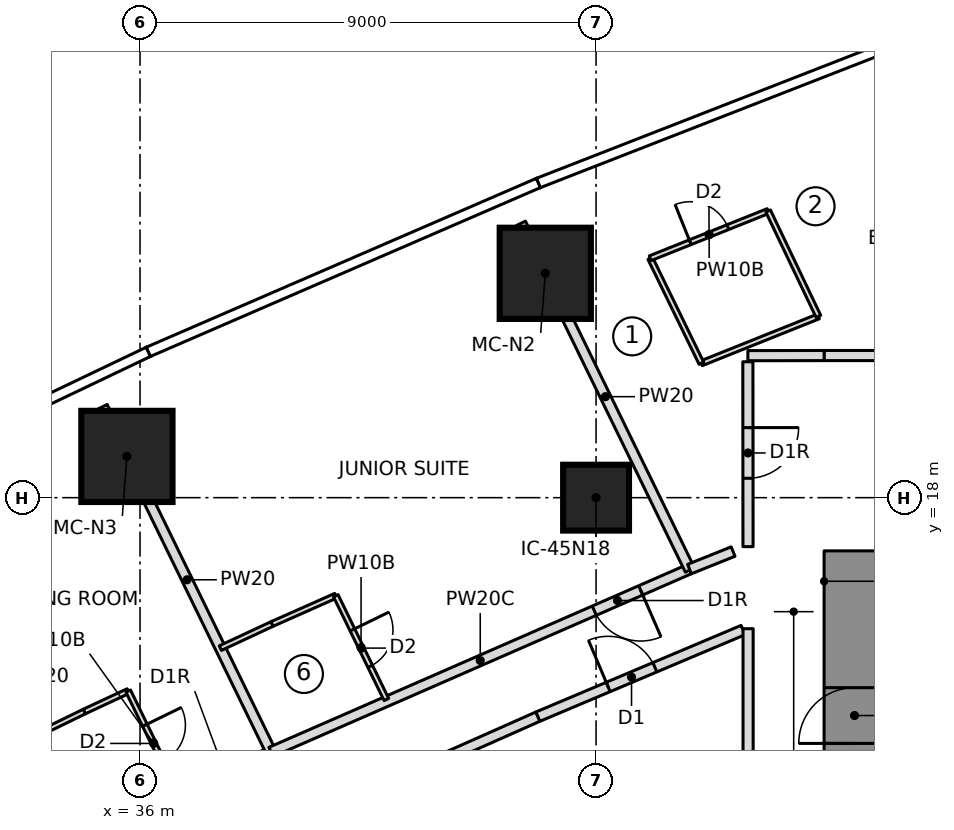
"""IFC4 building model, lengths in metres.
Left out: names, types, materials, properties, quantities, classifications, styles, units other than length and angle.
Written with IfcOpenShell. Run it as: python <this file> out.ifc"""

import sys

from ifc_helpers import new_model, si_unit, direction, frame, frame_2d, origin, origin_2d, place, context, subcontext, project, spatial, rectangle, extrude, element, fill, save


model = new_model("IFC4")
c1 = context("Model", 3, precision=1e-05, world=origin(), true_north=direction((0.0, 1.0)))
c2 = subcontext(c1, "Body", "Model", "MODEL_VIEW")
j1 = project(units=[si_unit("LENGTHUNIT", "METRE"), si_unit("PLANEANGLEUNIT", "RADIAN")], contexts=[c1])
p1 = place(None, origin())
s1 = spatial("IfcSite", under=j1, at=p1, CompositionType="ELEMENT")
p2 = place(p1, origin())
s2 = spatial("IfcBuilding", under=s1, at=p2, CompositionType="ELEMENT")
p3 = place(p2, frame((0.0, 0.0, 43.15)))
s3 = spatial("IfcBuildingStorey", under=s2, at=p3, CompositionType="ELEMENT", Elevation=43.15)
p4 = place(p3, frame((50.1, 6.65, 0.0), z_axis=(0.0, 0.0, 1.0), x_axis=(0.0, 1.0, 0.0)))
e1 = element("IfcWall", 1, at=p4, inside=s3, PredefinedType="SHEAR", context=c2, shape_type="SweptSolid", body=[
    extrude(rectangle(XDim=10.3, YDim=1.2, at=frame_2d((5.15, 0.0))), origin(), (0.0, 0.0, 1.0), 3.55),
])
p5 = place(p4, frame((6.5, 0.0, 0.0)))
e2 = element("IfcOpeningElement", 2, at=p5, cuts=e1, PredefinedType="OPENING", context=c2, shape_type="SweptSolid", body=[
    extrude(rectangle(XDim=1.1, YDim=2.1, at=frame_2d((0.55, 1.05))), frame((0.0, 0.61, 0.0), z_axis=(0.0, -1.0, 0.0), x_axis=(1.0, 0.0, 0.0)), (0.0, 0.0, 1.0), 1.22),
])
for number, where, z_axis, x_axis in (
    (3, (43.998, 22.428, 0.0), (0.0, 0.0, 1.0), (1.0, 0.0, 0.0)),
    (4, (35.741, 18.814, 0.0), (0.0, 0.0, 1.0), (1.0, 0.0, 0.0)),
):
    element("IfcColumn", number, at=place(p3, frame(where, z_axis=z_axis, x_axis=x_axis)), inside=s3, PredefinedType="COLUMN", context=c2, shape_type="SweptSolid", body=[
        extrude(rectangle(XDim=1.8, YDim=1.8, at=origin_2d()), origin(), (0.0, 0.0, 1.0), 3.55),
    ])
p6 = place(p3, frame((45.0, 18.0, 0.0), z_axis=(0.0, 0.0, 1.0), x_axis=(1.0, 0.0, 0.0)))
e5 = element("IfcColumn", 5, at=p6, inside=s3, PredefinedType="COLUMN", context=c2, shape_type="SweptSolid", body=[
    extrude(rectangle(XDim=1.3, YDim=1.3, at=origin_2d()), origin(), (0.0, 0.0, 1.0), 3.55),
])
p7 = place(p3, frame((34.513, 11.05, 0.0), z_axis=(0.0, 0.0, 1.0), x_axis=(-0.438187612283, 0.898883538865, 0.0)))
e6 = element("IfcWall", 6, at=p7, inside=s3, PredefinedType="PARTITIONING", context=c2, shape_type="SweptSolid", body=[
    extrude(rectangle(XDim=7.582, YDim=0.2, at=frame_2d((3.791, 0.0))), origin(), (0.0, 0.0, 1.0), 3.25),
])
p8 = place(p3, frame((38.585, 12.981, 0.0), z_axis=(0.0, 0.0, 1.0), x_axis=(-0.903706948966, -0.428151550727, 0.0)))
e7 = element("IfcWall", 7, at=p8, inside=s3, PredefinedType="PARTITIONING", context=c2, shape_type="SweptSolid", body=[
    extrude(rectangle(XDim=4.506, YDim=0.2, at=frame_2d((2.253, 0.0))), origin(), (0.0, 0.0, 1.0), 3.25),
])
p9 = place(p8, frame((0.5, 0.0, 0.0)))
e8 = element("IfcOpeningElement", 8, at=p9, cuts=e7, PredefinedType="OPENING", context=c2, shape_type="SweptSolid", body=[
    extrude(rectangle(XDim=1.0, YDim=2.1, at=frame_2d((0.5, 1.05))), frame((0.0, 0.11, 0.0), z_axis=(0.0, -1.0, 0.0), x_axis=(1.0, 0.0, 0.0)), (0.0, 0.0, 1.0), 0.22),
])
p10 = place(p3, frame((33.513, 13.101, 0.0), z_axis=(0.0, 0.0, 1.0), x_axis=(0.898338680123, 0.439303557685, 0.0)))
e9 = element("IfcWall", 9, at=p10, inside=s3, PredefinedType="PARTITIONING", context=c2, shape_type="SweptSolid", body=[
    extrude(rectangle(XDim=1.547, YDim=0.1, at=frame_2d((0.773, 0.0))), origin(), (0.0, 0.0, 1.0), 3.25),
])
p11 = place(p3, frame((34.903, 13.781, 0.0), z_axis=(0.0, 0.0, 1.0), x_axis=(0.906477304063, 0.422254540791, 0.0)))
e10 = element("IfcWall", 10, at=p11, inside=s3, PredefinedType="PARTITIONING", context=c2, shape_type="SweptSolid", body=[
    extrude(rectangle(XDim=0.953, YDim=0.1, at=frame_2d((0.477, 0.0))), origin(), (0.0, 0.0, 1.0), 3.25),
])
p12 = place(p3, frame((35.767, 14.183, 0.0), z_axis=(0.0, 0.0, 1.0), x_axis=(0.438229314017, -0.898863208912, 0.0)))
e11 = element("IfcWall", 11, at=p12, inside=s3, PredefinedType="PARTITIONING", context=c2, shape_type="SweptSolid", body=[
    extrude(rectangle(XDim=2.277, YDim=0.1, at=frame_2d((1.139, 0.0))), origin(), (0.0, 0.0, 1.0), 3.25),
])
p13 = place(p12, frame((0.75, 0.0, 0.0)))
e12 = element("IfcOpeningElement", 12, at=p13, cuts=e11, PredefinedType="OPENING", context=c2, shape_type="SweptSolid", body=[
    extrude(rectangle(XDim=0.8, YDim=2.1, at=frame_2d((0.4, 1.05))), frame((0.0, 0.06, 0.0), z_axis=(0.0, -1.0, 0.0), x_axis=(1.0, 0.0, 0.0)), (0.0, 0.0, 1.0), 0.12),
])
p14 = place(p3, frame((38.594, 12.963, 0.0), z_axis=(0.0, 0.0, 1.0), x_axis=(-0.438197705697, 0.898878618459, 0.0)))
e13 = element("IfcWall", 13, at=p14, inside=s3, PredefinedType="PARTITIONING", context=c2, shape_type="SweptSolid", body=[
    extrude(rectangle(XDim=7.601, YDim=0.2, at=frame_2d((3.801, 0.0))), origin(), (0.0, 0.0, 1.0), 3.25),
])
p15 = place(p3, frame((46.844, 16.591, 0.0), z_axis=(0.0, 0.0, 1.0), x_axis=(-0.916303988169, -0.400483459415, 0.0)))
e14 = element("IfcWall", 14, at=p15, inside=s3, PredefinedType="PARTITIONING", context=c2, shape_type="SweptSolid", body=[
    extrude(rectangle(XDim=9.013, YDim=0.2, at=frame_2d((4.507, 0.0))), origin(), (0.0, 0.0, 1.0), 3.25),
])
p16 = place(p15, frame((1.05, 0.0, 0.0)))
e15 = element("IfcOpeningElement", 15, at=p16, cuts=e14, PredefinedType="OPENING", context=c2, shape_type="SweptSolid", body=[
    extrude(rectangle(XDim=1.0, YDim=2.1, at=frame_2d((0.5, 1.05))), frame((0.0, 0.11, 0.0), z_axis=(0.0, -1.0, 0.0), x_axis=(1.0, 0.0, 0.0)), (0.0, 0.0, 1.0), 0.22),
])
p17 = place(p3, frame((37.586, 15.031, 0.0), z_axis=(0.0, 0.0, 1.0), x_axis=(0.90632717857, 0.422576673972, 0.0)))
e16 = element("IfcWall", 16, at=p17, inside=s3, PredefinedType="PARTITIONING", context=c2, shape_type="SweptSolid", body=[
    extrude(rectangle(XDim=1.125, YDim=0.1, at=frame_2d((0.563, 0.0))), origin(), (0.0, 0.0, 1.0), 3.25),
])
p18 = place(p3, frame((38.606, 15.507, 0.0), z_axis=(0.0, 0.0, 1.0), x_axis=(0.913972512123, 0.405776104625, 0.0)))
e17 = element("IfcWall", 17, at=p18, inside=s3, PredefinedType="PARTITIONING", context=c2, shape_type="SweptSolid", body=[
    extrude(rectangle(XDim=1.375, YDim=0.1, at=frame_2d((0.688, 0.0))), origin(), (0.0, 0.0, 1.0), 3.25),
])
p19 = place(p3, frame((39.863, 16.065, 0.0), z_axis=(0.0, 0.0, 1.0), x_axis=(0.438233629628, -0.898861104878, 0.0)))
e18 = element("IfcWall", 18, at=p19, inside=s3, PredefinedType="PARTITIONING", context=c2, shape_type="SweptSolid", body=[
    extrude(rectangle(XDim=2.279, YDim=0.1, at=frame_2d((1.139, 0.0))), origin(), (0.0, 0.0, 1.0), 3.25),
])
p20 = place(p19, frame((0.75, 0.0, 0.0)))
e19 = element("IfcOpeningElement", 19, at=p20, cuts=e18, PredefinedType="OPENING", context=c2, shape_type="SweptSolid", body=[
    extrude(rectangle(XDim=0.8, YDim=2.1, at=frame_2d((0.4, 1.05))), frame((0.0, 0.06, 0.0), z_axis=(0.0, -1.0, 0.0), x_axis=(1.0, 0.0, 0.0)), (0.0, 0.0, 1.0), 0.12),
])
p21 = place(p3, frame((46.852, 16.573, 0.0), z_axis=(0.0, 0.0, 1.0), x_axis=(-0.438196739796, 0.898879089328, 0.0)))
e20 = element("IfcWall", 20, at=p21, inside=s3, PredefinedType="PARTITIONING", context=c2, shape_type="SweptSolid", body=[
    extrude(rectangle(XDim=7.611, YDim=0.2, at=frame_2d((3.806, 0.0))), origin(), (0.0, 0.0, 1.0), 3.25),
])
p22 = place(p3, frame((49.388, 21.577, 0.0), z_axis=(0.0, 0.0, 1.0), x_axis=(-0.928266690687, -0.371915247014, 0.0)))
e21 = element("IfcWall", 21, at=p22, inside=s3, PredefinedType="PARTITIONING", context=c2, shape_type="SweptSolid", body=[
    extrude(rectangle(XDim=2.487, YDim=0.1, at=frame_2d((1.244, 0.0))), origin(), (0.0, 0.0, 1.0), 3.25),
])
p23 = place(p3, frame((47.079, 20.652, 0.0), z_axis=(0.0, 0.0, 1.0), x_axis=(-0.438171240168, 0.898891519756, 0.0)))
e22 = element("IfcWall", 22, at=p23, inside=s3, PredefinedType="PARTITIONING", context=c2, shape_type="SweptSolid", body=[
    extrude(rectangle(XDim=2.306, YDim=0.1, at=frame_2d((1.153, 0.0))), origin(), (0.0, 0.0, 1.0), 3.25),
])
p24 = place(p3, frame((46.069, 22.725, 0.0), z_axis=(0.0, 0.0, 1.0), x_axis=(0.928288495333, 0.371860819975, 0.0)))
e23 = element("IfcWall", 23, at=p24, inside=s3, PredefinedType="PARTITIONING", context=c2, shape_type="SweptSolid", body=[
    extrude(rectangle(XDim=2.507, YDim=0.1, at=frame_2d((1.253, 0.0))), origin(), (0.0, 0.0, 1.0), 3.25),
])
p25 = place(p24, frame((0.85, 0.0, 0.0)))
e24 = element("IfcOpeningElement", 24, at=p25, cuts=e23, PredefinedType="OPENING", context=c2, shape_type="SweptSolid", body=[
    extrude(rectangle(XDim=0.8, YDim=2.1, at=frame_2d((0.4, 1.05))), frame((0.0, 0.06, 0.0), z_axis=(0.0, -1.0, 0.0), x_axis=(1.0, 0.0, 0.0)), (0.0, 0.0, 1.0), 0.12),
])
p26 = place(p3, frame((43.85, 13.677, 0.0), z_axis=(0.0, 0.0, 1.0), x_axis=(0.921265924084, 0.388933281068, 0.0)))
e25 = element("IfcWall", 25, at=p26, inside=s3, PredefinedType="PARTITIONING", context=c2, shape_type="SweptSolid", body=[
    extrude(rectangle(XDim=4.396, YDim=0.2, at=frame_2d((2.198, 0.0))), origin(), (0.0, 0.0, 1.0), 3.25),
])
p27 = place(p26, frame((1.508, 0.0, 0.0)))
e26 = element("IfcOpeningElement", 26, at=p27, cuts=e25, PredefinedType="OPENING", context=c2, shape_type="SweptSolid", body=[
    extrude(rectangle(XDim=1.0, YDim=2.1, at=frame_2d((0.5, 1.05))), frame((0.0, 0.11, 0.0), z_axis=(0.0, -1.0, 0.0), x_axis=(1.0, 0.0, 0.0)), (0.0, 0.0, 1.0), 0.22),
])
p28 = place(p3, frame((40.18, 12.048, 0.0), z_axis=(0.0, 0.0, 1.0), x_axis=(0.913986953061, 0.405743576209, 0.0)))
e27 = element("IfcWall", 27, at=p28, inside=s3, PredefinedType="PARTITIONING", context=c2, shape_type="SweptSolid", body=[
    extrude(rectangle(XDim=4.016, YDim=0.2, at=frame_2d((2.008, 0.0))), origin(), (0.0, 0.0, 1.0), 3.25),
])
p29 = place(p3, frame((54.597, 20.805, 0.0), z_axis=(0.0, 0.0, 1.0), x_axis=(-1.0, 0.0, 0.0)))
e28 = element("IfcWall", 28, at=p29, inside=s3, PredefinedType="PARTITIONING", context=c2, shape_type="SweptSolid", body=[
    extrude(rectangle(XDim=5.097, YDim=0.2, at=frame_2d((2.548, 0.0))), origin(), (0.0, 0.0, 1.0), 3.25),
])
p30 = place(p29, frame((2.048, 0.0, 0.0)))
e29 = element("IfcOpeningElement", 29, at=p30, cuts=e28, PredefinedType="OPENING", context=c2, shape_type="SweptSolid", body=[
    extrude(rectangle(XDim=1.5, YDim=2.1, at=frame_2d((0.75, 1.05))), frame((0.0, 0.11, 0.0), z_axis=(0.0, -1.0, 0.0), x_axis=(1.0, 0.0, 0.0)), (0.0, 0.0, 1.0), 0.22),
])
p31 = place(p3, frame((48.396, 23.657, 0.0), z_axis=(0.0, 0.0, 1.0), x_axis=(0.4306119303, -0.902537182327, 0.0)))
e30 = element("IfcWall", 30, at=p31, inside=s3, PredefinedType="PARTITIONING", context=c2, shape_type="SweptSolid", body=[
    extrude(rectangle(XDim=2.305, YDim=0.1, at=frame_2d((1.152, 0.0))), origin(), (0.0, 0.0, 1.0), 3.25),
])
p32 = place(p3, frame((47.704, 16.936, 0.0), z_axis=(0.0, 0.0, 1.0), x_axis=(-0.927985537407, -0.372616213232, 0.0)))
e31 = element("IfcWall", 31, at=p32, inside=s3, PredefinedType="PARTITIONING", context=c2, shape_type="SweptSolid", body=[
    extrude(rectangle(XDim=0.927, YDim=0.2, at=frame_2d((0.463, 0.0))), origin(), (0.0, 0.0, 1.0), 3.25),
])
p33 = place(p3, frame((48.0, 15.414, 0.0), z_axis=(0.0, 0.0, 1.0), x_axis=(0.0, -1.0, 0.0)))
e32 = element("IfcWall", 32, at=p33, inside=s3, PredefinedType="PARTITIONING", context=c2, shape_type="SweptSolid", body=[
    extrude(rectangle(XDim=30.828, YDim=0.2, at=frame_2d((15.414, 0.0))), origin(), (0.0, 0.0, 1.0), 3.25),
])
p34 = place(p3, frame((49.5, 20.805, 0.0), z_axis=(0.0, 0.0, 1.0), x_axis=(-0.999998683182, -0.001622847587, 0.0)))
e33 = element("IfcWall", 33, at=p34, inside=s3, PredefinedType="PARTITIONING", context=c2, shape_type="SweptSolid", body=[
    extrude(rectangle(XDim=1.504, YDim=0.2, at=frame_2d((0.752, 0.0))), origin(), (0.0, 0.0, 1.0), 3.25),
])
p35 = place(p3, frame((47.996, 20.682, 0.0), z_axis=(0.0, 0.0, 1.0), x_axis=(0.000869739418, -0.999999621777, 0.0)))
e34 = element("IfcWall", 34, at=p35, inside=s3, PredefinedType="PARTITIONING", context=c2, shape_type="SweptSolid", body=[
    extrude(rectangle(XDim=3.649, YDim=0.2, at=frame_2d((1.825, 0.0))), origin(), (0.0, 0.0, 1.0), 3.25),
])
p36 = place(p35, frame((1.3, 0.0, 0.0)))
e35 = element("IfcOpeningElement", 35, at=p36, cuts=e34, PredefinedType="OPENING", context=c2, shape_type="SweptSolid", body=[
    extrude(rectangle(XDim=1.0, YDim=2.1, at=frame_2d((0.5, 1.05))), frame((0.0, 0.11, 0.0), z_axis=(0.0, -1.0, 0.0), x_axis=(1.0, 0.0, 0.0)), (0.0, 0.0, 1.0), 0.22),
])
p37 = place(p13, origin())
e36 = element("IfcDoor", 36, at=p37, inside=s3, OperationType="SINGLE_SWING_LEFT", PredefinedType="DOOR", context=c2, shape_type="SweptSolid", body=[
    extrude(rectangle(XDim=0.8, YDim=2.1, at=frame_2d((0.4, 1.05))), frame((0.0, 0.025, 0.0), z_axis=(0.0, -1.0, 0.0), x_axis=(1.0, 0.0, 0.0)), (0.0, 0.0, 1.0), 0.05),
])
fill(e12, e36)
p38 = place(p20, origin())
e37 = element("IfcDoor", 37, at=p38, inside=s3, OperationType="SINGLE_SWING_LEFT", PredefinedType="DOOR", context=c2, shape_type="SweptSolid", body=[
    extrude(rectangle(XDim=0.8, YDim=2.1, at=frame_2d((0.4, 1.05))), frame((0.0, 0.025, 0.0), z_axis=(0.0, -1.0, 0.0), x_axis=(1.0, 0.0, 0.0)), (0.0, 0.0, 1.0), 0.05),
])
fill(e19, e37)
p39 = place(p16, origin())
e38 = element("IfcDoor", 38, at=p39, inside=s3, OperationType="SINGLE_SWING_RIGHT", PredefinedType="DOOR", context=c2, shape_type="SweptSolid", body=[
    extrude(rectangle(XDim=1.0, YDim=2.1, at=frame_2d((0.5, 1.05))), frame((0.0, 0.025, 0.0), z_axis=(0.0, -1.0, 0.0), x_axis=(1.0, 0.0, 0.0)), (0.0, 0.0, 1.0), 0.05),
])
fill(e15, e38)
p40 = place(p25, origin())
e39 = element("IfcDoor", 39, at=p40, inside=s3, OperationType="SINGLE_SWING_LEFT", PredefinedType="DOOR", context=c2, shape_type="SweptSolid", body=[
    extrude(rectangle(XDim=0.8, YDim=2.1, at=frame_2d((0.4, 1.05))), frame((0.0, 0.025, 0.0), z_axis=(0.0, -1.0, 0.0), x_axis=(1.0, 0.0, 0.0)), (0.0, 0.0, 1.0), 0.05),
])
fill(e24, e39)
p41 = place(p27, origin())
e40 = element("IfcDoor", 40, at=p41, inside=s3, OperationType="SINGLE_SWING_LEFT", PredefinedType="DOOR", context=c2, shape_type="SweptSolid", body=[
    extrude(rectangle(XDim=1.0, YDim=2.1, at=frame_2d((0.5, 1.05))), frame((0.0, 0.025, 0.0), z_axis=(0.0, -1.0, 0.0), x_axis=(1.0, 0.0, 0.0)), (0.0, 0.0, 1.0), 0.05),
])
fill(e26, e40)
p42 = place(p36, origin())
e41 = element("IfcDoor", 41, at=p42, inside=s3, OperationType="SINGLE_SWING_RIGHT", PredefinedType="DOOR", context=c2, shape_type="SweptSolid", body=[
    extrude(rectangle(XDim=1.0, YDim=2.1, at=frame_2d((0.5, 1.05))), frame((0.0, 0.025, 0.0), z_axis=(0.0, -1.0, 0.0), x_axis=(1.0, 0.0, 0.0)), (0.0, 0.0, 1.0), 0.05),
])
fill(e35, e41)
p43 = place(p5, origin())
e42 = element("IfcDoor", 42, at=p43, inside=s3, OperationType="SINGLE_SWING_RIGHT", PredefinedType="DOOR", context=c2, shape_type="SweptSolid", body=[
    extrude(rectangle(XDim=1.1, YDim=2.1, at=frame_2d((0.55, 1.05))), frame((0.0, 0.025, 0.0), z_axis=(0.0, -1.0, 0.0), x_axis=(1.0, 0.0, 0.0)), (0.0, 0.0, 1.0), 0.05),
])
fill(e2, e42)
save(model, sys.argv[1])
